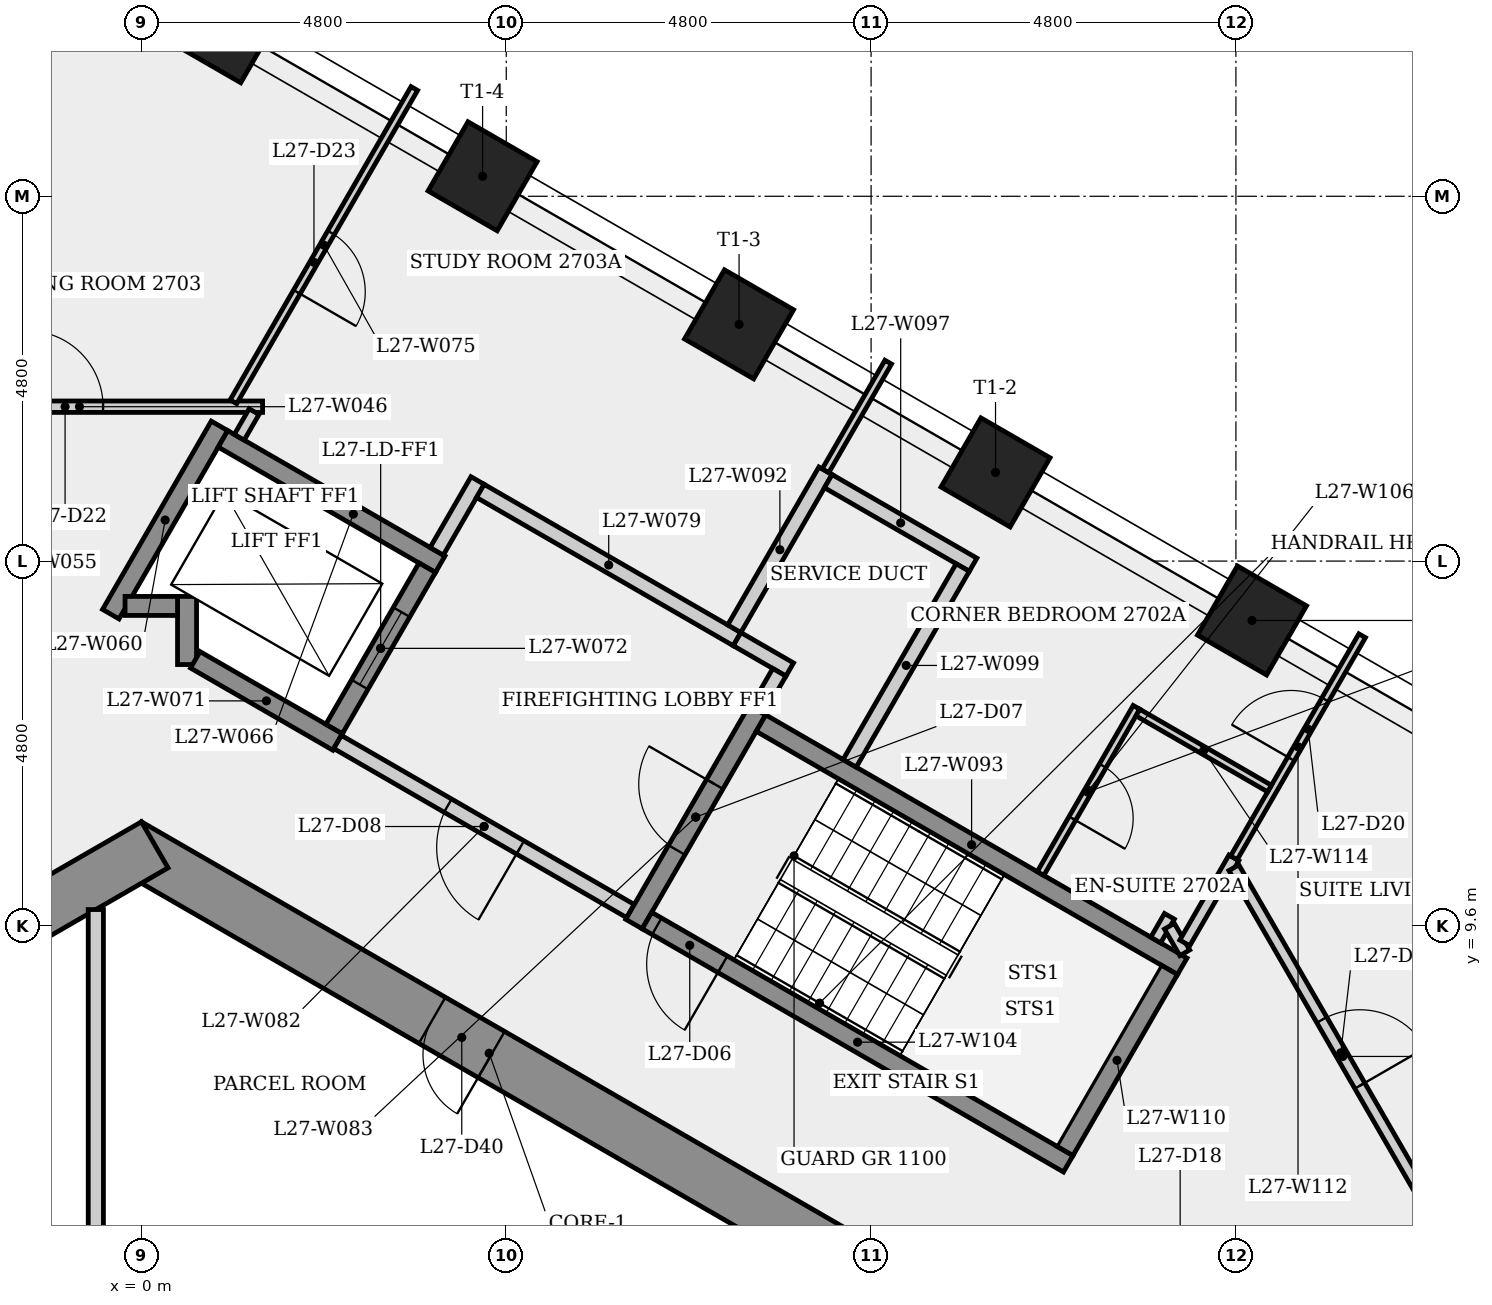
"""IFC4 building model, lengths in metres.
Left out: names, types, materials, properties, quantities, classifications, styles, units other than length and angle.
Written with IfcOpenShell. Run it as: python <this file> out.ifc"""

import sys

from ifc_helpers import new_model, si_unit, direction, frame, frame_2d, origin, origin_2d, place, context, subcontext, project, spatial, rectangle, extrude, element, fill, save


model = new_model("IFC4")
c1 = context("Model", 3, precision=1e-05, world=origin(), true_north=direction((0.0, 1.0)))
c2 = subcontext(c1, "Body", "Model", "MODEL_VIEW")
j1 = project(units=[si_unit("LENGTHUNIT", "METRE"), si_unit("PLANEANGLEUNIT", "RADIAN")], contexts=[c1])
p1 = place(None, origin())
s1 = spatial("IfcSite", under=j1, at=p1, CompositionType="ELEMENT")
p2 = place(p1, origin())
s2 = spatial("IfcBuilding", under=s1, at=p2, CompositionType="ELEMENT")
p3 = place(p2, frame((0.0, 0.0, 103.5)))
s3 = spatial("IfcBuildingStorey", under=s2, at=p3, CompositionType="ELEMENT", Elevation=103.5)
p4 = place(p3, frame((9.325, 5.182, 0.0), z_axis=(0.0, 0.0, 1.0), x_axis=(-0.866023993627, 0.500002442456, 0.0)))
e1 = element("IfcWall", 1, at=p4, inside=s3, PredefinedType="SHEAR", context=c2, shape_type="SweptSolid", body=[
    extrude(rectangle(XDim=10.97, YDim=0.7, at=frame_2d((5.485, 0.0))), origin(), (0.0, 0.0, 1.0), 3.4),
])
p5 = place(p4, frame((5.451, 0.0, 0.0)))
e2 = element("IfcOpeningElement", 2, at=p5, cuts=e1, PredefinedType="OPENING", context=c2, shape_type="SweptSolid", body=[
    extrude(rectangle(XDim=0.9, YDim=2.1, at=frame_2d((0.45, 1.05))), frame((0.0, 0.36, 0.0), z_axis=(0.0, -1.0, 0.0), x_axis=(1.0, 0.0, 0.0)), (0.0, 0.0, 1.0), 0.72),
])
p6 = place(p3, frame((0.175, 10.667, 0.0), z_axis=(0.0, 0.0, 1.0), x_axis=(-0.866023993627, -0.500002442456, 0.0)))
e3 = element("IfcWall", 3, at=p6, inside=s3, PredefinedType="SHEAR", context=c2, shape_type="SweptSolid", body=[
    extrude(rectangle(XDim=10.97, YDim=0.7, at=frame_2d((5.485, 0.0))), origin(), (0.0, 0.0, 1.0), 3.4),
])
p7 = place(p6, frame((7.021, 0.0, 0.0)))
e4 = element("IfcOpeningElement", 4, at=p7, cuts=e3, PredefinedType="OPENING", context=c2, shape_type="SweptSolid", body=[
    extrude(rectangle(XDim=0.9, YDim=2.1, at=frame_2d((0.45, 1.05))), frame((0.0, 0.36, 0.0), z_axis=(0.0, -1.0, 0.0), x_axis=(1.0, 0.0, 0.0)), (0.0, 0.0, 1.0), 0.72),
])
for number, where, z_axis, x_axis in (
    (5, (14.611, 13.619, 0.0), (0.0, 0.0, 1.0), (0.5, 0.866, 0.0)),
    (6, (11.237, 15.567, 0.0), (0.0, 0.0, 1.0), (0.5, 0.866, 0.0)),
    (7, (7.863, 17.515, 0.0), (0.0, 0.0, 1.0), (0.5, 0.866, 0.0)),
    (8, (4.489, 19.463, 0.0), (0.0, 0.0, 1.0), (0.5, 0.866, 0.0)),
    (9, (1.114, 21.411, 0.0), (0.0, 0.0, 1.0), (0.5, 0.866, 0.0)),
):
    element("IfcColumn", number, at=place(p3, frame(where, z_axis=z_axis, x_axis=x_axis)), inside=s3, PredefinedType="COLUMN", context=c2, shape_type="SweptSolid", body=[
        extrude(rectangle(XDim=1.05, YDim=1.05, at=origin_2d()), origin(), (0.0, 0.0, 1.0), 3.4),
    ])
p8 = place(p3, frame((-3.225, 16.431, 0.0), z_axis=(0.0, 0.0, 1.0), x_axis=(1.0, 0.0, 0.0)))
e10 = element("IfcWall", 10, at=p8, inside=s3, PredefinedType="PARTITIONING", context=c2, shape_type="SweptSolid", body=[
    extrude(rectangle(XDim=4.819, YDim=0.15, at=frame_2d((2.41, 0.0))), origin(), (0.0, 0.0, 1.0), 3.05),
])
p9 = place(p8, frame((1.72, 0.0, 0.0)))
e11 = element("IfcOpeningElement", 11, at=p9, cuts=e10, PredefinedType="OPENING", context=c2, shape_type="SweptSolid", body=[
    extrude(rectangle(XDim=1.0, YDim=2.1, at=frame_2d((0.5, 1.05))), frame((0.0, 0.085, 0.0), z_axis=(0.0, -1.0, 0.0), x_axis=(1.0, 0.0, 0.0)), (0.0, 0.0, 1.0), 0.17),
])
p10 = place(p3, frame((-0.6, 9.815, 0.0), z_axis=(0.0, 0.0, 1.0), x_axis=(0.0, -1.0, 0.0)))
e12 = element("IfcWall", 12, at=p10, inside=s3, PredefinedType="PARTITIONING", context=c2, shape_type="SweptSolid", body=[
    extrude(rectangle(XDim=4.54, YDim=0.2, at=frame_2d((2.27, 0.0))), origin(), (0.0, 0.0, 1.0), 3.05),
])
p11 = place(p3, frame((-0.403, 13.702, 0.0), z_axis=(0.0, 0.0, 1.0), x_axis=(0.499976111731, 0.866039195244, 0.0)))
e13 = element("IfcWall", 13, at=p11, inside=s3, PredefinedType="SHEAR", context=c2, shape_type="SweptSolid", body=[
    extrude(rectangle(XDim=2.861, YDim=0.25, at=frame_2d((1.43, 0.0))), origin(), (0.0, 0.0, 1.0), 3.05),
])
p12 = place(p3, frame((0.6, 13.039, 0.0), z_axis=(0.0, 0.0, 1.0), x_axis=(0.0, 1.0, 0.0)))
e14 = element("IfcWall", 14, at=p12, inside=s3, PredefinedType="SHEAR", context=c2, shape_type="SweptSolid", body=[
    extrude(rectangle(XDim=0.896, YDim=0.25, at=frame_2d((0.448, 0.0))), origin(), (0.0, 0.0, 1.0), 3.05),
])
p13 = place(p3, frame((0.475, 13.81, 0.0), z_axis=(0.0, 0.0, 1.0), x_axis=(-1.0, 0.0, 0.0)))
e15 = element("IfcWall", 15, at=p13, inside=s3, PredefinedType="SHEAR", context=c2, shape_type="SweptSolid", body=[
    extrude(rectangle(XDim=0.691, YDim=0.25, at=frame_2d((0.345, 0.0))), origin(), (0.0, 0.0, 1.0), 3.4),
])
p14 = place(p3, frame((1.073, 16.008, 0.0), z_axis=(0.0, 0.0, 1.0), x_axis=(0.866040211805, -0.499974350878, 0.0)))
e16 = element("IfcWall", 16, at=p14, inside=s3, PredefinedType="SHEAR", context=c2, shape_type="SweptSolid", body=[
    extrude(rectangle(XDim=3.3, YDim=0.25, at=frame_2d((1.65, 0.0))), origin(), (0.0, 0.0, 1.0), 3.05),
])
p15 = place(p3, frame((1.482, 16.366, 0.0), z_axis=(0.0, 0.0, 1.0), x_axis=(-0.500047902311, -0.865997745606, 0.0)))
e17 = element("IfcWall", 17, at=p15, inside=s3, PredefinedType="PARTITIONING", context=c2, shape_type="SweptSolid", body=[
    extrude(rectangle(XDim=0.39, YDim=0.15, at=frame_2d((0.195, 0.0))), origin(), (0.0, 0.0, 1.0), 3.05),
])
p16 = place(p3, frame((2.581, 12.02, 0.0), z_axis=(0.0, 0.0, 1.0), x_axis=(-0.86603892542, 0.499976579108, 0.0)))
e18 = element("IfcWall", 18, at=p16, inside=s3, PredefinedType="SHEAR", context=c2, shape_type="SweptSolid", body=[
    extrude(rectangle(XDim=2.162, YDim=0.25, at=frame_2d((1.081, 0.0))), origin(), (0.0, 0.0, 1.0), 3.05),
])
p17 = place(p3, frame((2.535, 12.191, 0.0), z_axis=(0.0, 0.0, 1.0), x_axis=(0.500061746146, 0.865989751695, 0.0)))
e19 = element("IfcWall", 19, at=p17, inside=s3, PredefinedType="SHEAR", context=c2, shape_type="SweptSolid", body=[
    extrude(rectangle(XDim=2.45, YDim=0.25, at=frame_2d((1.225, 0.0))), origin(), (0.0, 0.0, 1.0), 3.4),
])
p18 = place(p17, frame((0.675, 0.0, 0.0)))
e20 = element("IfcOpeningElement", 20, at=p18, cuts=e19, PredefinedType="OPENING", context=c2, shape_type="SweptSolid", body=[
    extrude(rectangle(XDim=1.1, YDim=2.1, at=frame_2d((0.55, 1.05))), frame((0.0, 0.135, 0.0), z_axis=(0.0, -1.0, 0.0), x_axis=(1.0, 0.0, 0.0)), (0.0, 0.0, 1.0), 0.27),
])
p19 = place(p3, frame((3.59, 20.618, 0.0), z_axis=(0.0, 0.0, 1.0), x_axis=(-0.500006646563, -0.866021566356, 0.0)))
e21 = element("IfcWall", 21, at=p19, inside=s3, PredefinedType="PARTITIONING", context=c2, shape_type="SweptSolid", body=[
    extrude(rectangle(XDim=4.759, YDim=0.1, at=frame_2d((2.38, 0.0))), origin(), (0.0, 0.0, 1.0), 3.05),
])
p20 = place(p19, frame((2.19, 0.0, 0.0)))
e22 = element("IfcOpeningElement", 22, at=p20, cuts=e21, PredefinedType="OPENING", context=c2, shape_type="SweptSolid", body=[
    extrude(rectangle(XDim=0.9, YDim=2.1, at=frame_2d((0.45, 1.05))), frame((0.0, 0.06, 0.0), z_axis=(0.0, -1.0, 0.0), x_axis=(1.0, 0.0, 0.0)), (0.0, 0.0, 1.0), 0.12),
])
p21 = place(p3, frame((3.885, 14.529, 0.0), z_axis=(0.0, 0.0, 1.0), x_axis=(0.499997628298, 0.866026773083, 0.0)))
e23 = element("IfcWall", 23, at=p21, inside=s3, PredefinedType="PARTITIONING", context=c2, shape_type="SweptSolid", body=[
    extrude(rectangle(XDim=1.075, YDim=0.2, at=frame_2d((0.538, 0.0))), origin(), (0.0, 0.0, 1.0), 3.05),
])
p22 = place(p3, frame((4.459, 15.323, 0.0), z_axis=(0.0, 0.0, 1.0), x_axis=(0.866015672276, -0.500016855088, 0.0)))
e24 = element("IfcWall", 24, at=p22, inside=s3, PredefinedType="PARTITIONING", context=c2, shape_type="SweptSolid", body=[
    extrude(rectangle(XDim=3.9, YDim=0.2, at=frame_2d((1.95, 0.0))), origin(), (0.0, 0.0, 1.0), 3.05),
])
p23 = place(p3, frame((6.435, 9.795, 0.0), z_axis=(0.0, 0.0, 1.0), x_axis=(-0.866012907634, 0.500021643343, 0.0)))
e25 = element("IfcWall", 25, at=p23, inside=s3, PredefinedType="PARTITIONING", context=c2, shape_type="SweptSolid", body=[
    extrude(rectangle(XDim=4.45, YDim=0.2, at=frame_2d((2.225, 0.0))), origin(), (0.0, 0.0, 1.0), 3.05),
])
p24 = place(p23, frame((1.675, 0.0, 0.0)))
e26 = element("IfcOpeningElement", 26, at=p24, cuts=e25, PredefinedType="OPENING", context=c2, shape_type="SweptSolid", body=[
    extrude(rectangle(XDim=1.1, YDim=2.1, at=frame_2d((0.55, 1.05))), frame((0.0, 0.11, 0.0), z_axis=(0.0, -1.0, 0.0), x_axis=(1.0, 0.0, 0.0)), (0.0, 0.0, 1.0), 0.22),
])
p25 = place(p3, frame((6.48, 9.624, 0.0), z_axis=(0.0, 0.0, 1.0), x_axis=(0.500017246033, 0.866015446554, 0.0)))
e27 = element("IfcWall", 27, at=p25, inside=s3, PredefinedType="SHEAR", context=c2, shape_type="SweptSolid", body=[
    extrude(rectangle(XDim=3.25, YDim=0.25, at=frame_2d((1.625, 0.0))), origin(), (0.0, 0.0, 1.0), 3.05),
])
p26 = place(p25, frame((1.125, 0.0, 0.0)))
e28 = element("IfcOpeningElement", 28, at=p26, cuts=e27, PredefinedType="OPENING", context=c2, shape_type="SweptSolid", body=[
    extrude(rectangle(XDim=1.0, YDim=2.1, at=frame_2d((0.5, 1.05))), frame((0.0, 0.135, 0.0), z_axis=(0.0, -1.0, 0.0), x_axis=(1.0, 0.0, 0.0)), (0.0, 0.0, 1.0), 0.27),
])
p27 = place(p3, frame((7.836, 13.373, 0.0), z_axis=(0.0, 0.0, 1.0), x_axis=(0.866094119867, -0.499880961361, 0.0)))
e29 = element("IfcWall", 29, at=p27, inside=s3, PredefinedType="PLUMBINGWALL", context=c2, shape_type="SweptSolid", body=[
    extrude(rectangle(XDim=0.8, YDim=0.2, at=frame_2d((0.4, 0.0))), origin(), (0.0, 0.0, 1.0), 3.05),
])
p28 = place(p3, frame((7.8, 13.51, 0.0), z_axis=(0.0, 0.0, 1.0), x_axis=(0.500001309137, 0.866024647952, 0.0)))
e30 = element("IfcWall", 30, at=p28, inside=s3, PredefinedType="PLUMBINGWALL", context=c2, shape_type="SweptSolid", body=[
    extrude(rectangle(XDim=2.4, YDim=0.2, at=frame_2d((1.2, 0.0))), origin(), (0.0, 0.0, 1.0), 3.05),
])
p29 = place(p3, frame((8.151, 12.268, 0.0), z_axis=(0.0, 0.0, 1.0), x_axis=(0.866025499775, -0.499999833739, 0.0)))
e31 = element("IfcWall", 31, at=p29, inside=s3, PredefinedType="SHEAR", context=c2, shape_type="SweptSolid", body=[
    extrude(rectangle(XDim=6.4, YDim=0.25, at=frame_2d((3.2, 0.0))), origin(), (0.0, 0.0, 1.0), 3.05),
])
p30 = place(p3, frame((8.393, 12.937, 0.0), z_axis=(0.0, 0.0, 1.0), x_axis=(-0.500065409566, -0.86598763626, 0.0)))
e32 = element("IfcWall", 32, at=p30, inside=s3, PredefinedType="PLUMBINGWALL", context=c2, shape_type="SweptSolid", body=[
    extrude(rectangle(XDim=0.575, YDim=0.2, at=frame_2d((0.288, 0.0))), origin(), (0.0, 0.0, 1.0), 3.05),
])
p31 = place(p3, frame((9.0, 15.588, 0.0), z_axis=(0.0, 0.0, 1.0), x_axis=(0.499957196903, 0.866050114754, 0.0)))
e33 = element("IfcWall", 33, at=p31, inside=s3, PredefinedType="PARTITIONING", context=c2, shape_type="SweptSolid", body=[
    extrude(rectangle(XDim=1.651, YDim=0.1, at=frame_2d((0.825, 0.0))), origin(), (0.0, 0.0, 1.0), 3.05),
])
p32 = place(p3, frame((9.037, 15.452, 0.0), z_axis=(0.0, 0.0, 1.0), x_axis=(0.866008176907, -0.50002983664, 0.0)))
e34 = element("IfcWall", 34, at=p32, inside=s3, PredefinedType="PLUMBINGWALL", context=c2, shape_type="SweptSolid", body=[
    extrude(rectangle(XDim=2.2, YDim=0.2, at=frame_2d((1.1, 0.0))), origin(), (0.0, 0.0, 1.0), 3.05),
])
p33 = place(p3, frame((10.805, 14.315, 0.0), z_axis=(0.0, 0.0, 1.0), x_axis=(-0.500013701029, -0.866017493347, 0.0)))
e35 = element("IfcWall", 35, at=p33, inside=s3, PredefinedType="PLUMBINGWALL", context=c2, shape_type="SweptSolid", body=[
    extrude(rectangle(XDim=2.975, YDim=0.2, at=frame_2d((1.488, 0.0))), origin(), (0.0, 0.0, 1.0), 3.05),
])
p34 = place(p3, frame((12.194, 6.47, 0.0), z_axis=(0.0, 0.0, 1.0), x_axis=(-0.866025499775, 0.499999833739, 0.0)))
e36 = element("IfcWall", 36, at=p34, inside=s3, PredefinedType="SHEAR", context=c2, shape_type="SweptSolid", body=[
    extrude(rectangle(XDim=6.4, YDim=0.25, at=frame_2d((3.2, 0.0))), origin(), (0.0, 0.0, 1.0), 3.05),
])
p35 = place(p34, frame((5.25, 0.0, 0.0)))
e37 = element("IfcOpeningElement", 37, at=p35, cuts=e36, PredefinedType="OPENING", context=c2, shape_type="SweptSolid", body=[
    extrude(rectangle(XDim=1.0, YDim=2.1, at=frame_2d((0.5, 1.05))), frame((0.0, 0.135, 0.0), z_axis=(0.0, -1.0, 0.0), x_axis=(1.0, 0.0, 0.0)), (0.0, 0.0, 1.0), 0.27),
])
p36 = place(p3, frame((13.092, 12.476, 0.0), z_axis=(0.0, 0.0, 1.0), x_axis=(-0.500048846702, -0.865997200291, 0.0)))
e38 = element("IfcWall", 38, at=p36, inside=s3, PredefinedType="PARTITIONING", context=c2, shape_type="SweptSolid", body=[
    extrude(rectangle(XDim=2.525, YDim=0.1, at=frame_2d((1.263, 0.0))), origin(), (0.0, 0.0, 1.0), 3.05),
])
p37 = place(p36, frame((0.887, 0.0, 0.0)))
e39 = element("IfcOpeningElement", 39, at=p37, cuts=e38, PredefinedType="OPENING", context=c2, shape_type="SweptSolid", body=[
    extrude(rectangle(XDim=0.8, YDim=2.1, at=frame_2d((0.4, 1.05))), frame((0.0, 0.06, 0.0), z_axis=(0.0, -1.0, 0.0), x_axis=(1.0, 0.0, 0.0)), (0.0, 0.0, 1.0), 0.12),
])
p38 = place(p3, frame((13.345, 9.414, 0.0), z_axis=(0.0, 0.0, 1.0), x_axis=(0.500074377092, 0.865982457891, 0.0)))
e40 = element("IfcWall", 40, at=p38, inside=s3, PredefinedType="PARTITIONING", context=c2, shape_type="SweptSolid", body=[
    extrude(rectangle(XDim=0.36, YDim=0.15, at=frame_2d((0.18, 0.0))), origin(), (0.0, 0.0, 1.0), 3.05),
])
p39 = place(p3, frame((13.525, 9.596, 0.0), z_axis=(0.0, 0.0, 1.0), x_axis=(0.500297731093, -0.865853440406, 0.0)))
e41 = element("IfcWall", 41, at=p39, inside=s3, PredefinedType="PARTITIONING", context=c2, shape_type="SweptSolid", body=[
    extrude(rectangle(XDim=0.404, YDim=0.15, at=frame_2d((0.202, 0.0))), origin(), (0.0, 0.0, 1.0), 3.05),
])
p40 = place(p3, frame((13.523, 9.022, 0.0), z_axis=(0.0, 0.0, 1.0), x_axis=(-0.500034990121, -0.866005201286, 0.0)))
e42 = element("IfcWall", 42, at=p40, inside=s3, PredefinedType="SHEAR", context=c2, shape_type="SweptSolid", body=[
    extrude(rectangle(XDim=2.75, YDim=0.25, at=frame_2d((1.375, 0.0))), origin(), (0.0, 0.0, 1.0), 3.05),
])
p41 = place(p3, frame((13.727, 9.376, 0.0), z_axis=(0.0, 0.0, 1.0), x_axis=(0.499978610854, 0.866037752461, 0.0)))
e43 = element("IfcWall", 43, at=p41, inside=s3, PredefinedType="PARTITIONING", context=c2, shape_type="SweptSolid", body=[
    extrude(rectangle(XDim=1.292, YDim=0.15, at=frame_2d((0.646, 0.0))), origin(), (0.0, 0.0, 1.0), 3.05),
])
p42 = place(p3, frame((14.373, 10.495, 0.0), z_axis=(0.0, 0.0, 1.0), x_axis=(0.500006363716, 0.86602172966, 0.0)))
e44 = element("IfcWall", 44, at=p42, inside=s3, PredefinedType="PARTITIONING", context=c2, shape_type="SweptSolid", body=[
    extrude(rectangle(XDim=3.375, YDim=0.1, at=frame_2d((1.687, 0.0))), origin(), (0.0, 0.0, 1.0), 3.05),
])
p43 = place(p42, frame((1.504, 0.0, 0.0)))
e45 = element("IfcOpeningElement", 45, at=p43, cuts=e44, PredefinedType="OPENING", context=c2, shape_type="SweptSolid", body=[
    extrude(rectangle(XDim=0.9, YDim=2.1, at=frame_2d((0.45, 1.05))), frame((0.0, 0.06, 0.0), z_axis=(0.0, -1.0, 0.0), x_axis=(1.0, 0.0, 0.0)), (0.0, 0.0, 1.0), 0.12),
])
p44 = place(p3, frame((14.373, 10.365, 0.0), z_axis=(0.0, 0.0, 1.0), x_axis=(0.499985338323, -0.866033868542, 0.0)))
e46 = element("IfcWall", 46, at=p44, inside=s3, PredefinedType="PARTITIONING", context=c2, shape_type="SweptSolid", body=[
    extrude(rectangle(XDim=5.735, YDim=0.15, at=frame_2d((2.867, 0.0))), origin(), (0.0, 0.0, 1.0), 3.05),
])
p45 = place(p44, frame((2.312, 0.0, 0.0)))
e47 = element("IfcOpeningElement", 47, at=p45, cuts=e46, PredefinedType="OPENING", context=c2, shape_type="SweptSolid", body=[
    extrude(rectangle(XDim=1.0, YDim=2.1, at=frame_2d((0.5, 1.05))), frame((0.0, 0.085, 0.0), z_axis=(0.0, -1.0, 0.0), x_axis=(1.0, 0.0, 0.0)), (0.0, 0.0, 1.0), 0.17),
])
p46 = place(p3, frame((14.842, 11.407, 0.0), z_axis=(0.0, 0.0, 1.0), x_axis=(-0.866010750942, 0.50002537861, 0.0)))
e48 = element("IfcWall", 48, at=p46, inside=s3, PredefinedType="PARTITIONING", context=c2, shape_type="SweptSolid", body=[
    extrude(rectangle(XDim=2.0, YDim=0.1, at=frame_2d((1.0, 0.0))), origin(), (0.0, 0.0, 1.0), 3.05),
])
p47 = place(p35, origin())
e49 = element("IfcDoor", 49, at=p47, inside=s3, OperationType="SINGLE_SWING_LEFT", PredefinedType="DOOR", context=c2, shape_type="SweptSolid", body=[
    extrude(rectangle(XDim=1.0, YDim=2.1, at=frame_2d((0.5, 1.05))), frame((0.0, 0.025, 0.0), z_axis=(0.0, -1.0, 0.0), x_axis=(1.0, 0.0, 0.0)), (0.0, 0.0, 1.0), 0.05),
])
fill(e37, e49)
p48 = place(p26, origin())
e50 = element("IfcDoor", 50, at=p48, inside=s3, OperationType="SINGLE_SWING_RIGHT", PredefinedType="DOOR", context=c2, shape_type="SweptSolid", body=[
    extrude(rectangle(XDim=1.0, YDim=2.1, at=frame_2d((0.5, 1.05))), frame((0.0, 0.025, 0.0), z_axis=(0.0, -1.0, 0.0), x_axis=(1.0, 0.0, 0.0)), (0.0, 0.0, 1.0), 0.05),
])
fill(e28, e50)
p49 = place(p24, origin())
e51 = element("IfcDoor", 51, at=p49, inside=s3, OperationType="SINGLE_SWING_LEFT", PredefinedType="DOOR", context=c2, shape_type="SweptSolid", body=[
    extrude(rectangle(XDim=1.1, YDim=2.1, at=frame_2d((0.55, 1.05))), frame((0.0, 0.025, 0.0), z_axis=(0.0, -1.0, 0.0), x_axis=(1.0, 0.0, 0.0)), (0.0, 0.0, 1.0), 0.05),
])
fill(e26, e51)
p50 = place(p18, origin())
e52 = element("IfcDoor", 52, at=p50, inside=s3, OperationType="SLIDING_TO_LEFT", PredefinedType="DOOR", context=c2, shape_type="SweptSolid", body=[
    extrude(rectangle(XDim=1.1, YDim=2.1, at=frame_2d((0.55, 1.05))), frame((0.0, 0.025, 0.0), z_axis=(0.0, -1.0, 0.0), x_axis=(1.0, 0.0, 0.0)), (0.0, 0.0, 1.0), 0.05),
])
fill(e20, e52)
p51 = place(p45, origin())
e53 = element("IfcDoor", 53, at=p51, inside=s3, OperationType="SINGLE_SWING_RIGHT", PredefinedType="DOOR", context=c2, shape_type="SweptSolid", body=[
    extrude(rectangle(XDim=1.0, YDim=2.1, at=frame_2d((0.5, 1.05))), frame((0.0, 0.025, 0.0), z_axis=(0.0, -1.0, 0.0), x_axis=(1.0, 0.0, 0.0)), (0.0, 0.0, 1.0), 0.05),
])
fill(e47, e53)
p52 = place(p43, origin())
e54 = element("IfcDoor", 54, at=p52, inside=s3, OperationType="SINGLE_SWING_LEFT", PredefinedType="DOOR", context=c2, shape_type="SweptSolid", body=[
    extrude(rectangle(XDim=0.9, YDim=2.1, at=frame_2d((0.45, 1.05))), frame((0.0, 0.025, 0.0), z_axis=(0.0, -1.0, 0.0), x_axis=(1.0, 0.0, 0.0)), (0.0, 0.0, 1.0), 0.05),
])
fill(e45, e54)
p53 = place(p37, origin())
e55 = element("IfcDoor", 55, at=p53, inside=s3, OperationType="SINGLE_SWING_RIGHT", PredefinedType="DOOR", context=c2, shape_type="SweptSolid", body=[
    extrude(rectangle(XDim=0.8, YDim=2.1, at=frame_2d((0.4, 1.05))), frame((0.0, 0.025, 0.0), z_axis=(0.0, -1.0, 0.0), x_axis=(1.0, 0.0, 0.0)), (0.0, 0.0, 1.0), 0.05),
])
fill(e39, e55)
p54 = place(p9, origin())
e56 = element("IfcDoor", 56, at=p54, inside=s3, OperationType="SINGLE_SWING_LEFT", PredefinedType="DOOR", context=c2, shape_type="SweptSolid", body=[
    extrude(rectangle(XDim=1.0, YDim=2.1, at=frame_2d((0.5, 1.05))), frame((0.0, 0.025, 0.0), z_axis=(0.0, -1.0, 0.0), x_axis=(1.0, 0.0, 0.0)), (0.0, 0.0, 1.0), 0.05),
])
fill(e11, e56)
p55 = place(p20, origin())
e57 = element("IfcDoor", 57, at=p55, inside=s3, OperationType="SINGLE_SWING_RIGHT", PredefinedType="DOOR", context=c2, shape_type="SweptSolid", body=[
    extrude(rectangle(XDim=0.9, YDim=2.1, at=frame_2d((0.45, 1.05))), frame((0.0, 0.025, 0.0), z_axis=(0.0, -1.0, 0.0), x_axis=(1.0, 0.0, 0.0)), (0.0, 0.0, 1.0), 0.05),
])
fill(e22, e57)
p56 = place(p5, origin())
e58 = element("IfcDoor", 58, at=p56, inside=s3, OperationType="SINGLE_SWING_LEFT", PredefinedType="DOOR", context=c2, shape_type="SweptSolid", body=[
    extrude(rectangle(XDim=0.9, YDim=2.1, at=frame_2d((0.45, 1.05))), frame((0.0, 0.025, 0.0), z_axis=(0.0, -1.0, 0.0), x_axis=(1.0, 0.0, 0.0)), (0.0, 0.0, 1.0), 0.05),
])
fill(e2, e58)
save(model, sys.argv[1])
